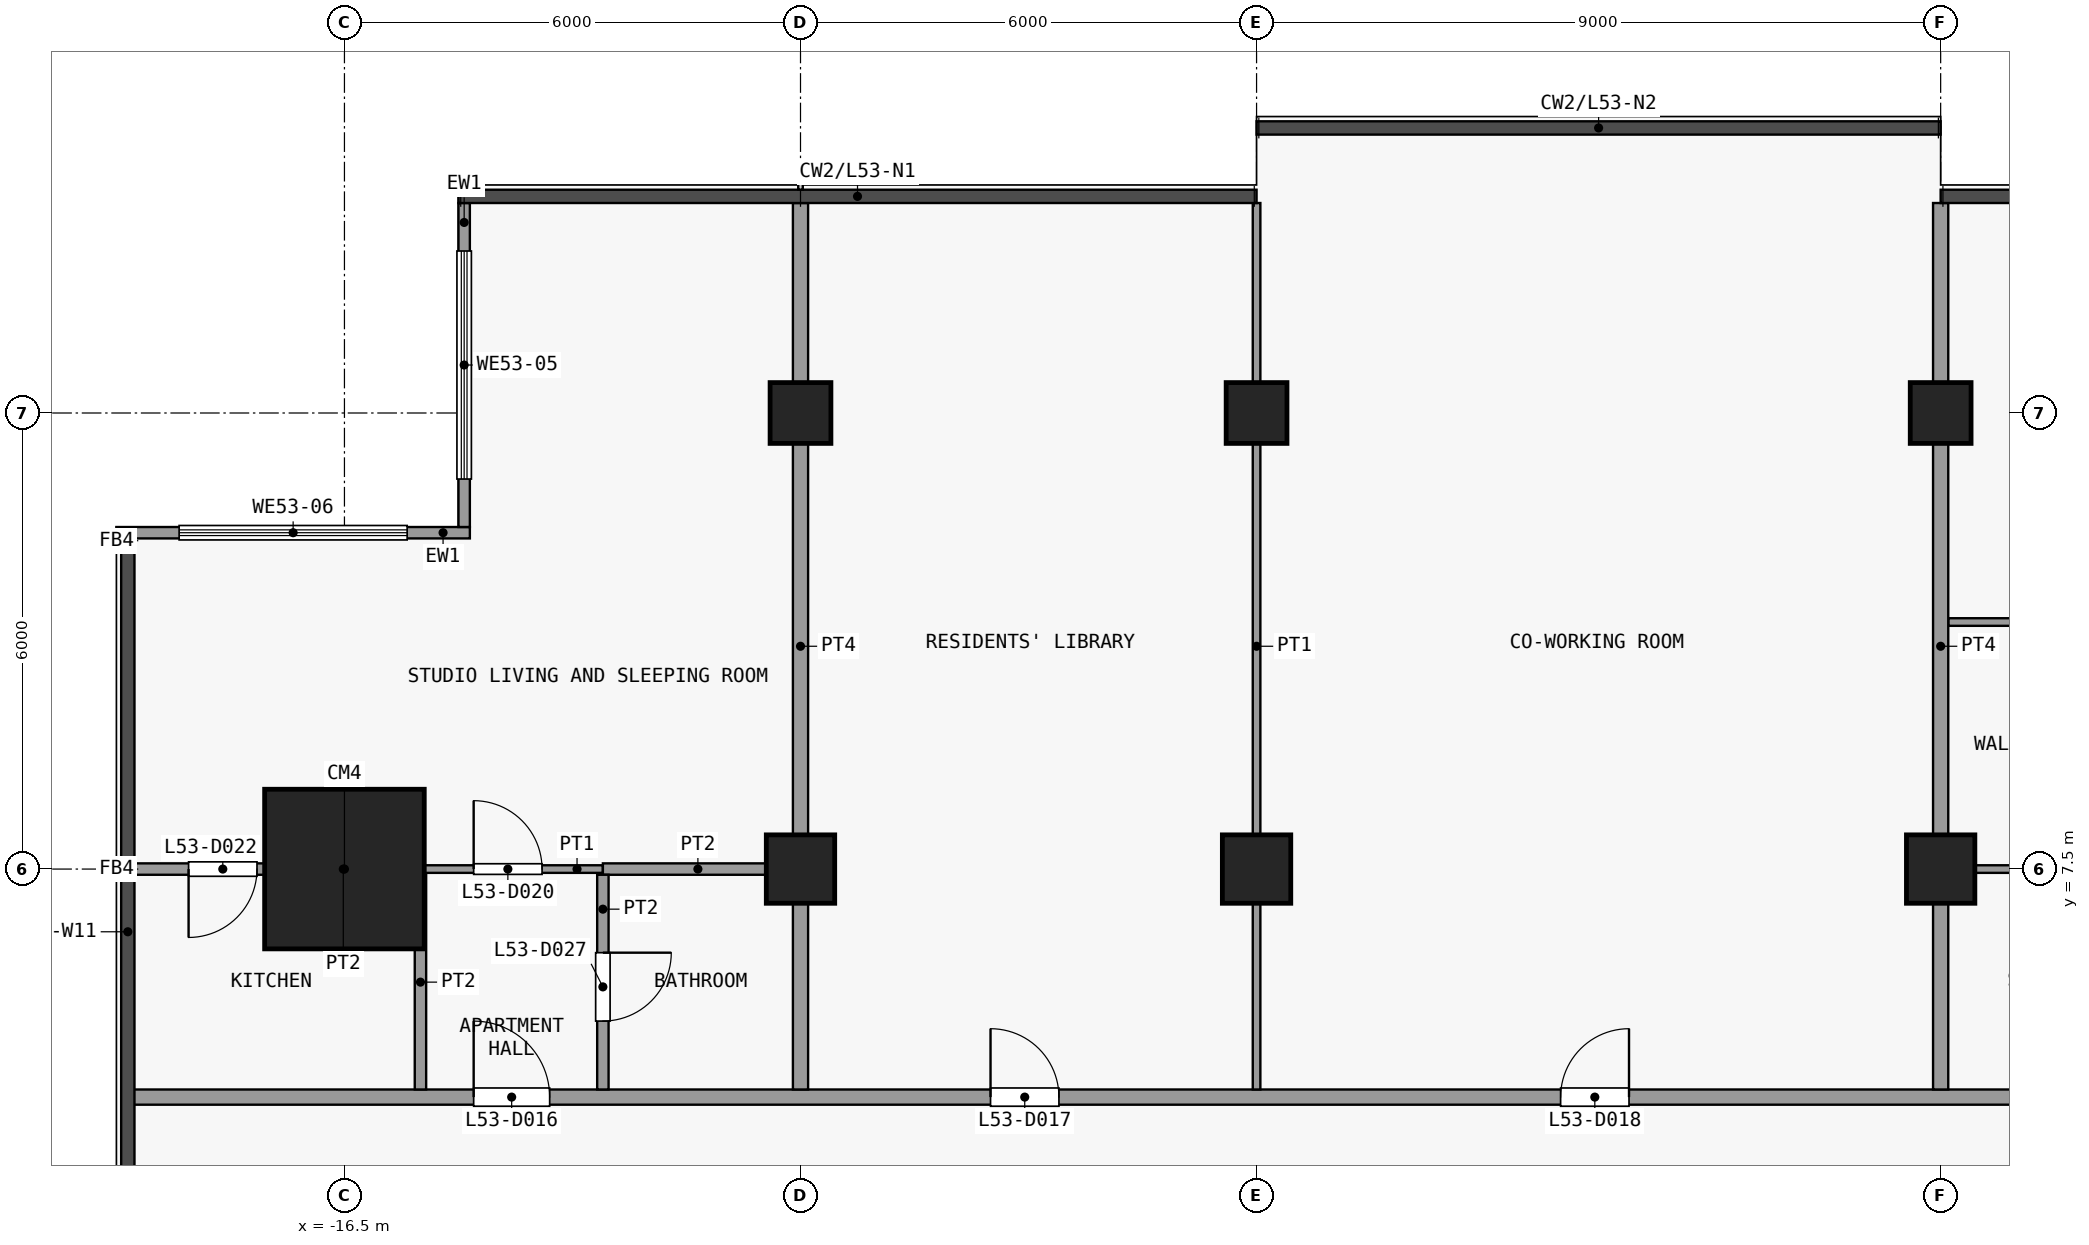
"""IFC4 building model, lengths in metres.
Left out: names, types, materials, properties, quantities, classifications, styles, units other than length and angle.
Written with IfcOpenShell. Run it as: python <this file> out.ifc"""

import sys

from ifc_helpers import new_model, si_unit, direction, frame, frame_2d, origin, origin_2d, place, context, subcontext, project, spatial, rectangle, extrude, element, fill, save


model = new_model("IFC4")
c1 = context("Model", 3, precision=1e-05, world=origin(), true_north=direction((0.0, 1.0)))
c2 = subcontext(c1, "Body", "Model", "MODEL_VIEW")
j1 = project(units=[si_unit("LENGTHUNIT", "METRE"), si_unit("PLANEANGLEUNIT", "RADIAN")], contexts=[c1])
p1 = place(None, origin())
s1 = spatial("IfcSite", under=j1, at=p1, CompositionType="ELEMENT")
p2 = place(p1, origin())
s2 = spatial("IfcBuilding", under=s1, at=p2, CompositionType="ELEMENT")
p3 = place(p2, frame((0.0, 0.0, 212.3)))
s3 = spatial("IfcBuildingStorey", under=s2, at=p3, CompositionType="ELEMENT", Elevation=212.3)
p4 = place(p3, frame((-16.5, 7.5, 0.0), z_axis=(0.0, 0.0, 1.0), x_axis=(1.0, 0.0, 0.0)))
e1 = element("IfcColumn", 1, at=p4, inside=s3, PredefinedType="COLUMN", context=c2, shape_type="SweptSolid", body=[
    extrude(rectangle(XDim=2.1, YDim=2.1, at=origin_2d()), origin(), (0.0, 0.0, 1.0), 3.6),
])
p5 = place(p3, frame((-10.5, 7.5, 0.0), z_axis=(0.0, 0.0, 1.0), x_axis=(1.0, 0.0, 0.0)))
e2 = element("IfcColumn", 2, at=p5, inside=s3, PredefinedType="COLUMN", context=c2, shape_type="SweptSolid", body=[
    extrude(rectangle(XDim=0.9, YDim=0.9, at=origin_2d()), origin(), (0.0, 0.0, 1.0), 3.6),
])
p6 = place(p3, frame((-10.5, 13.5, 0.0), z_axis=(0.0, 0.0, 1.0), x_axis=(1.0, 0.0, 0.0)))
e3 = element("IfcColumn", 3, at=p6, inside=s3, PredefinedType="COLUMN", context=c2, shape_type="SweptSolid", body=[
    extrude(rectangle(XDim=0.8, YDim=0.8, at=origin_2d()), origin(), (0.0, 0.0, 1.0), 3.6),
])
p7 = place(p3, frame((-4.5, 7.5, 0.0), z_axis=(0.0, 0.0, 1.0), x_axis=(1.0, 0.0, 0.0)))
e4 = element("IfcColumn", 4, at=p7, inside=s3, PredefinedType="COLUMN", context=c2, shape_type="SweptSolid", body=[
    extrude(rectangle(XDim=0.9, YDim=0.9, at=origin_2d()), origin(), (0.0, 0.0, 1.0), 3.6),
])
p8 = place(p3, frame((-4.5, 13.5, 0.0), z_axis=(0.0, 0.0, 1.0), x_axis=(1.0, 0.0, 0.0)))
e5 = element("IfcColumn", 5, at=p8, inside=s3, PredefinedType="COLUMN", context=c2, shape_type="SweptSolid", body=[
    extrude(rectangle(XDim=0.8, YDim=0.8, at=origin_2d()), origin(), (0.0, 0.0, 1.0), 3.6),
])
p9 = place(p3, frame((4.5, 7.5, 0.0), z_axis=(0.0, 0.0, 1.0), x_axis=(1.0, 0.0, 0.0)))
e6 = element("IfcColumn", 6, at=p9, inside=s3, PredefinedType="COLUMN", context=c2, shape_type="SweptSolid", body=[
    extrude(rectangle(XDim=0.9, YDim=0.9, at=origin_2d()), origin(), (0.0, 0.0, 1.0), 3.6),
])
p10 = place(p3, frame((4.5, 13.5, 0.0), z_axis=(0.0, 0.0, 1.0), x_axis=(1.0, 0.0, 0.0)))
e7 = element("IfcColumn", 7, at=p10, inside=s3, PredefinedType="COLUMN", context=c2, shape_type="SweptSolid", body=[
    extrude(rectangle(XDim=0.8, YDim=0.8, at=origin_2d()), origin(), (0.0, 0.0, 1.0), 3.6),
])
p11 = place(p3, frame((-14.925, 12.0, 0.0), z_axis=(0.0, 0.0, 1.0), x_axis=(0.0, 1.0, 0.0)))
e8 = element("IfcWall", 8, at=p11, inside=s3, PredefinedType="SOLIDWALL", context=c2, shape_type="SweptSolid", body=[
    extrude(rectangle(XDim=4.262, YDim=0.15, at=frame_2d((2.131, 0.0))), origin(), (0.0, 0.0, 1.0), 3.3),
])
p12 = place(p11, frame((0.631, 0.0, 0.9)))
e9 = element("IfcOpeningElement", 9, at=p12, cuts=e8, PredefinedType="OPENING", context=c2, shape_type="SweptSolid", body=[
    extrude(rectangle(XDim=3.0, YDim=2.4, at=frame_2d((1.5, 1.2))), frame((0.0, 0.085, 0.0), z_axis=(0.0, -1.0, 0.0), x_axis=(1.0, 0.0, 0.0)), (0.0, 0.0, 1.0), 0.17),
])
p13 = place(p3, frame((-19.5, 11.925, 0.0), z_axis=(0.0, 0.0, 1.0), x_axis=(1.0, 0.0, 0.0)))
e10 = element("IfcWall", 10, at=p13, inside=s3, PredefinedType="SOLIDWALL", context=c2, shape_type="SweptSolid", body=[
    extrude(rectangle(XDim=4.65, YDim=0.15, at=frame_2d((2.325, 0.0))), origin(), (0.0, 0.0, 1.0), 3.3),
])
p14 = place(p13, frame((0.825, 0.0, 0.9)))
e11 = element("IfcOpeningElement", 11, at=p14, cuts=e10, PredefinedType="OPENING", context=c2, shape_type="SweptSolid", body=[
    extrude(rectangle(XDim=3.0, YDim=2.4, at=frame_2d((1.5, 1.2))), frame((0.0, 0.085, 0.0), z_axis=(0.0, -1.0, 0.0), x_axis=(1.0, 0.0, 0.0)), (0.0, 0.0, 1.0), 0.17),
])
p15 = place(p3, frame((-19.35, 4.5, 0.0), z_axis=(0.0, 0.0, 1.0), x_axis=(1.0, 0.0, 0.0)))
e12 = element("IfcWall", 12, at=p15, inside=s3, PredefinedType="PARTITIONING", context=c2, shape_type="SweptSolid", body=[
    extrude(rectangle(XDim=38.7, YDim=0.2, at=frame_2d((19.35, 0.0))), origin(), (0.0, 0.0, 1.0), 3.3),
])
p16 = place(p15, frame((4.55, 0.0, 0.0)))
e13 = element("IfcOpeningElement", 13, at=p16, cuts=e12, PredefinedType="OPENING", context=c2, shape_type="SweptSolid", body=[
    extrude(rectangle(XDim=1.0, YDim=2.1, at=frame_2d((0.5, 1.05))), frame((0.0, 0.11, 0.0), z_axis=(0.0, -1.0, 0.0), x_axis=(1.0, 0.0, 0.0)), (0.0, 0.0, 1.0), 0.22),
])
p17 = place(p15, frame((11.35, 0.0, 0.0)))
e14 = element("IfcOpeningElement", 14, at=p17, cuts=e12, PredefinedType="OPENING", context=c2, shape_type="SweptSolid", body=[
    extrude(rectangle(XDim=0.9, YDim=2.1, at=frame_2d((0.45, 1.05))), frame((0.0, 0.11, 0.0), z_axis=(0.0, -1.0, 0.0), x_axis=(1.0, 0.0, 0.0)), (0.0, 0.0, 1.0), 0.22),
])
p18 = place(p15, frame((18.85, 0.0, 0.0)))
e15 = element("IfcOpeningElement", 15, at=p18, cuts=e12, PredefinedType="OPENING", context=c2, shape_type="SweptSolid", body=[
    extrude(rectangle(XDim=0.9, YDim=2.1, at=frame_2d((0.45, 1.05))), frame((0.0, 0.11, 0.0), z_axis=(0.0, -1.0, 0.0), x_axis=(1.0, 0.0, 0.0)), (0.0, 0.0, 1.0), 0.22),
])
p19 = place(p15, frame((30.55, 0.0, 0.0)))
e16 = element("IfcOpeningElement", 16, at=p19, cuts=e12, PredefinedType="OPENING", context=c2, shape_type="SweptSolid", body=[
    extrude(rectangle(XDim=1.0, YDim=2.1, at=frame_2d((0.5, 1.05))), frame((0.0, 0.11, 0.0), z_axis=(0.0, -1.0, 0.0), x_axis=(1.0, 0.0, 0.0)), (0.0, 0.0, 1.0), 0.22),
])
p20 = place(p3, frame((-15.5, 7.5, 0.0), z_axis=(0.0, 0.0, 1.0), x_axis=(1.0, 0.0, 0.0)))
e17 = element("IfcWall", 17, at=p20, inside=s3, PredefinedType="PARTITIONING", context=c2, shape_type="SweptSolid", body=[
    extrude(rectangle(XDim=2.4, YDim=0.1, at=frame_2d((1.2, 0.0))), origin(), (0.0, 0.0, 1.0), 3.3),
])
p21 = place(p20, frame((0.7, 0.0, 0.0)))
e18 = element("IfcOpeningElement", 18, at=p21, cuts=e17, PredefinedType="OPENING", context=c2, shape_type="SweptSolid", body=[
    extrude(rectangle(XDim=0.9, YDim=2.1, at=frame_2d((0.45, 1.05))), frame((0.0, 0.06, 0.0), z_axis=(0.0, -1.0, 0.0), x_axis=(1.0, 0.0, 0.0)), (0.0, 0.0, 1.0), 0.12),
])
p22 = place(p3, frame((4.6, 7.5, 0.0), z_axis=(0.0, 0.0, 1.0), x_axis=(1.0, 0.0, 0.0)))
e19 = element("IfcWall", 19, at=p22, inside=s3, PredefinedType="PARTITIONING", context=c2, shape_type="SweptSolid", body=[
    extrude(rectangle(XDim=2.4, YDim=0.1, at=frame_2d((1.2, 0.0))), origin(), (0.0, 0.0, 1.0), 3.3),
])
p23 = place(p3, frame((-19.262, 7.5, 0.0), z_axis=(0.0, 0.0, 1.0), x_axis=(1.0, 0.0, 0.0)))
e20 = element("IfcWall", 20, at=p23, inside=s3, PredefinedType="PARTITIONING", context=c2, shape_type="SweptSolid", body=[
    extrude(rectangle(XDim=3.762, YDim=0.15, at=frame_2d((1.881, 0.0))), origin(), (0.0, 0.0, 1.0), 3.3),
])
p24 = place(p23, frame((0.712, 0.0, 0.0)))
e21 = element("IfcOpeningElement", 21, at=p24, cuts=e20, PredefinedType="OPENING", context=c2, shape_type="SweptSolid", body=[
    extrude(rectangle(XDim=0.9, YDim=2.1, at=frame_2d((0.45, 1.05))), frame((0.0, 0.085, 0.0), z_axis=(0.0, -1.0, 0.0), x_axis=(1.0, 0.0, 0.0)), (0.0, 0.0, 1.0), 0.17),
])
p25 = place(p3, frame((-13.1, 7.5, 0.0), z_axis=(0.0, 0.0, 1.0), x_axis=(1.0, 0.0, 0.0)))
e22 = element("IfcWall", 22, at=p25, inside=s3, PredefinedType="PARTITIONING", context=c2, shape_type="SweptSolid", body=[
    extrude(rectangle(XDim=2.5, YDim=0.15, at=frame_2d((1.25, 0.0))), origin(), (0.0, 0.0, 1.0), 3.3),
])
p26 = place(p3, frame((4.6, 10.75, 0.0), z_axis=(0.0, 0.0, 1.0), x_axis=(1.0, 0.0, 0.0)))
e23 = element("IfcWall", 23, at=p26, inside=s3, PredefinedType="PARTITIONING", context=c2, shape_type="SweptSolid", body=[
    extrude(rectangle(XDim=3.2, YDim=0.1, at=frame_2d((1.6, 0.0))), origin(), (0.0, 0.0, 1.0), 3.3),
])
p27 = place(p26, frame((1.1, 0.0, 0.0)))
e24 = element("IfcOpeningElement", 24, at=p27, cuts=e23, PredefinedType="OPENING", context=c2, shape_type="SweptSolid", body=[
    extrude(rectangle(XDim=0.9, YDim=2.1, at=frame_2d((0.45, 1.05))), frame((0.0, 0.06, 0.0), z_axis=(0.0, -1.0, 0.0), x_axis=(1.0, 0.0, 0.0)), (0.0, 0.0, 1.0), 0.12),
])
p28 = place(p3, frame((-15.5, 4.6, 0.0), z_axis=(0.0, 0.0, 1.0), x_axis=(0.0, 1.0, 0.0)))
e25 = element("IfcWall", 25, at=p28, inside=s3, PredefinedType="PARTITIONING", context=c2, shape_type="SweptSolid", body=[
    extrude(rectangle(XDim=2.825, YDim=0.15, at=frame_2d((1.413, 0.0))), origin(), (0.0, 0.0, 1.0), 3.3),
])
p29 = place(p3, frame((-13.1, 4.6, 0.0), z_axis=(0.0, 0.0, 1.0), x_axis=(0.0, 1.0, 0.0)))
e26 = element("IfcWall", 26, at=p29, inside=s3, PredefinedType="PARTITIONING", context=c2, shape_type="SweptSolid", body=[
    extrude(rectangle(XDim=2.825, YDim=0.15, at=frame_2d((1.413, 0.0))), origin(), (0.0, 0.0, 1.0), 3.3),
])
p30 = place(p29, frame((0.9, 0.0, 0.0)))
e27 = element("IfcOpeningElement", 27, at=p30, cuts=e26, PredefinedType="OPENING", context=c2, shape_type="SweptSolid", body=[
    extrude(rectangle(XDim=0.9, YDim=2.1, at=frame_2d((0.45, 1.05))), frame((0.0, 0.085, 0.0), z_axis=(0.0, -1.0, 0.0), x_axis=(1.0, 0.0, 0.0)), (0.0, 0.0, 1.0), 0.17),
])
p31 = place(p3, frame((-10.5, 4.6, 0.0), z_axis=(0.0, 0.0, 1.0), x_axis=(0.0, 1.0, 0.0)))
e28 = element("IfcWall", 28, at=p31, inside=s3, PredefinedType="PARTITIONING", context=c2, shape_type="SweptSolid", body=[
    extrude(rectangle(XDim=11.662, YDim=0.2, at=frame_2d((5.831, 0.0))), origin(), (0.0, 0.0, 1.0), 3.3),
])
p32 = place(p3, frame((-4.5, 4.6, 0.0), z_axis=(0.0, 0.0, 1.0), x_axis=(0.0, 1.0, 0.0)))
e29 = element("IfcWall", 29, at=p32, inside=s3, PredefinedType="PARTITIONING", context=c2, shape_type="SweptSolid", body=[
    extrude(rectangle(XDim=11.662, YDim=0.1, at=frame_2d((5.831, 0.0))), origin(), (0.0, 0.0, 1.0), 3.3),
])
p33 = place(p3, frame((4.5, 4.6, 0.0), z_axis=(0.0, 0.0, 1.0), x_axis=(0.0, 1.0, 0.0)))
e30 = element("IfcWall", 30, at=p33, inside=s3, PredefinedType="PARTITIONING", context=c2, shape_type="SweptSolid", body=[
    extrude(rectangle(XDim=11.662, YDim=0.2, at=frame_2d((5.831, 0.0))), origin(), (0.0, 0.0, 1.0), 3.3),
])
p34 = place(p12, origin())
e31 = element("IfcWindow", 31, at=p34, inside=s3, PartitioningType="SINGLE_PANEL", PredefinedType="WINDOW", context=c2, shape_type="SweptSolid", body=[
    extrude(rectangle(XDim=3.0, YDim=2.4, at=frame_2d((1.5, 1.2))), frame((0.0, 0.03, 0.0), z_axis=(0.0, -1.0, 0.0), x_axis=(1.0, 0.0, 0.0)), (0.0, 0.0, 1.0), 0.06),
])
fill(e9, e31)
p35 = place(p14, origin())
e32 = element("IfcWindow", 32, at=p35, inside=s3, PartitioningType="SINGLE_PANEL", PredefinedType="WINDOW", context=c2, shape_type="SweptSolid", body=[
    extrude(rectangle(XDim=3.0, YDim=2.4, at=frame_2d((1.5, 1.2))), frame((0.0, 0.03, 0.0), z_axis=(0.0, -1.0, 0.0), x_axis=(1.0, 0.0, 0.0)), (0.0, 0.0, 1.0), 0.06),
])
fill(e11, e32)
p36 = place(p16, origin())
e33 = element("IfcDoor", 33, at=p36, inside=s3, OperationType="SINGLE_SWING_RIGHT", PredefinedType="DOOR", context=c2, shape_type="SweptSolid", body=[
    extrude(rectangle(XDim=1.0, YDim=2.1, at=frame_2d((0.5, 1.05))), frame((0.0, 0.025, 0.0), z_axis=(0.0, -1.0, 0.0), x_axis=(1.0, 0.0, 0.0)), (0.0, 0.0, 1.0), 0.05),
])
fill(e13, e33)
p37 = place(p17, origin())
e34 = element("IfcDoor", 34, at=p37, inside=s3, OperationType="SINGLE_SWING_RIGHT", PredefinedType="DOOR", context=c2, shape_type="SweptSolid", body=[
    extrude(rectangle(XDim=0.9, YDim=2.1, at=frame_2d((0.45, 1.05))), frame((0.0, 0.025, 0.0), z_axis=(0.0, -1.0, 0.0), x_axis=(1.0, 0.0, 0.0)), (0.0, 0.0, 1.0), 0.05),
])
fill(e14, e34)
p38 = place(p18, origin())
e35 = element("IfcDoor", 35, at=p38, inside=s3, OperationType="SINGLE_SWING_LEFT", PredefinedType="DOOR", context=c2, shape_type="SweptSolid", body=[
    extrude(rectangle(XDim=0.9, YDim=2.1, at=frame_2d((0.45, 1.05))), frame((0.0, 0.025, 0.0), z_axis=(0.0, -1.0, 0.0), x_axis=(1.0, 0.0, 0.0)), (0.0, 0.0, 1.0), 0.05),
])
fill(e15, e35)
p39 = place(p21, origin())
e36 = element("IfcDoor", 36, at=p39, inside=s3, OperationType="SINGLE_SWING_RIGHT", PredefinedType="DOOR", context=c2, shape_type="SweptSolid", body=[
    extrude(rectangle(XDim=0.9, YDim=2.1, at=frame_2d((0.45, 1.05))), frame((0.0, 0.025, 0.0), z_axis=(0.0, -1.0, 0.0), x_axis=(1.0, 0.0, 0.0)), (0.0, 0.0, 1.0), 0.05),
])
fill(e18, e36)
p40 = place(p24, origin())
e37 = element("IfcDoor", 37, at=p40, inside=s3, OperationType="SINGLE_SWING_LEFT", PredefinedType="DOOR", context=c2, shape_type="SweptSolid", body=[
    extrude(rectangle(XDim=0.9, YDim=2.1, at=frame_2d((0.45, 1.05))), frame((0.0, 0.025, 0.0), z_axis=(0.0, -1.0, 0.0), x_axis=(1.0, 0.0, 0.0)), (0.0, 0.0, 1.0), 0.05),
])
fill(e21, e37)
p41 = place(p30, origin())
e38 = element("IfcDoor", 38, at=p41, inside=s3, OperationType="SINGLE_SWING_RIGHT", PredefinedType="DOOR", context=c2, shape_type="SweptSolid", body=[
    extrude(rectangle(XDim=0.9, YDim=2.1, at=frame_2d((0.45, 1.05))), frame((0.0, 0.025, 0.0), z_axis=(0.0, -1.0, 0.0), x_axis=(1.0, 0.0, 0.0)), (0.0, 0.0, 1.0), 0.05),
])
fill(e27, e38)
save(model, sys.argv[1])
